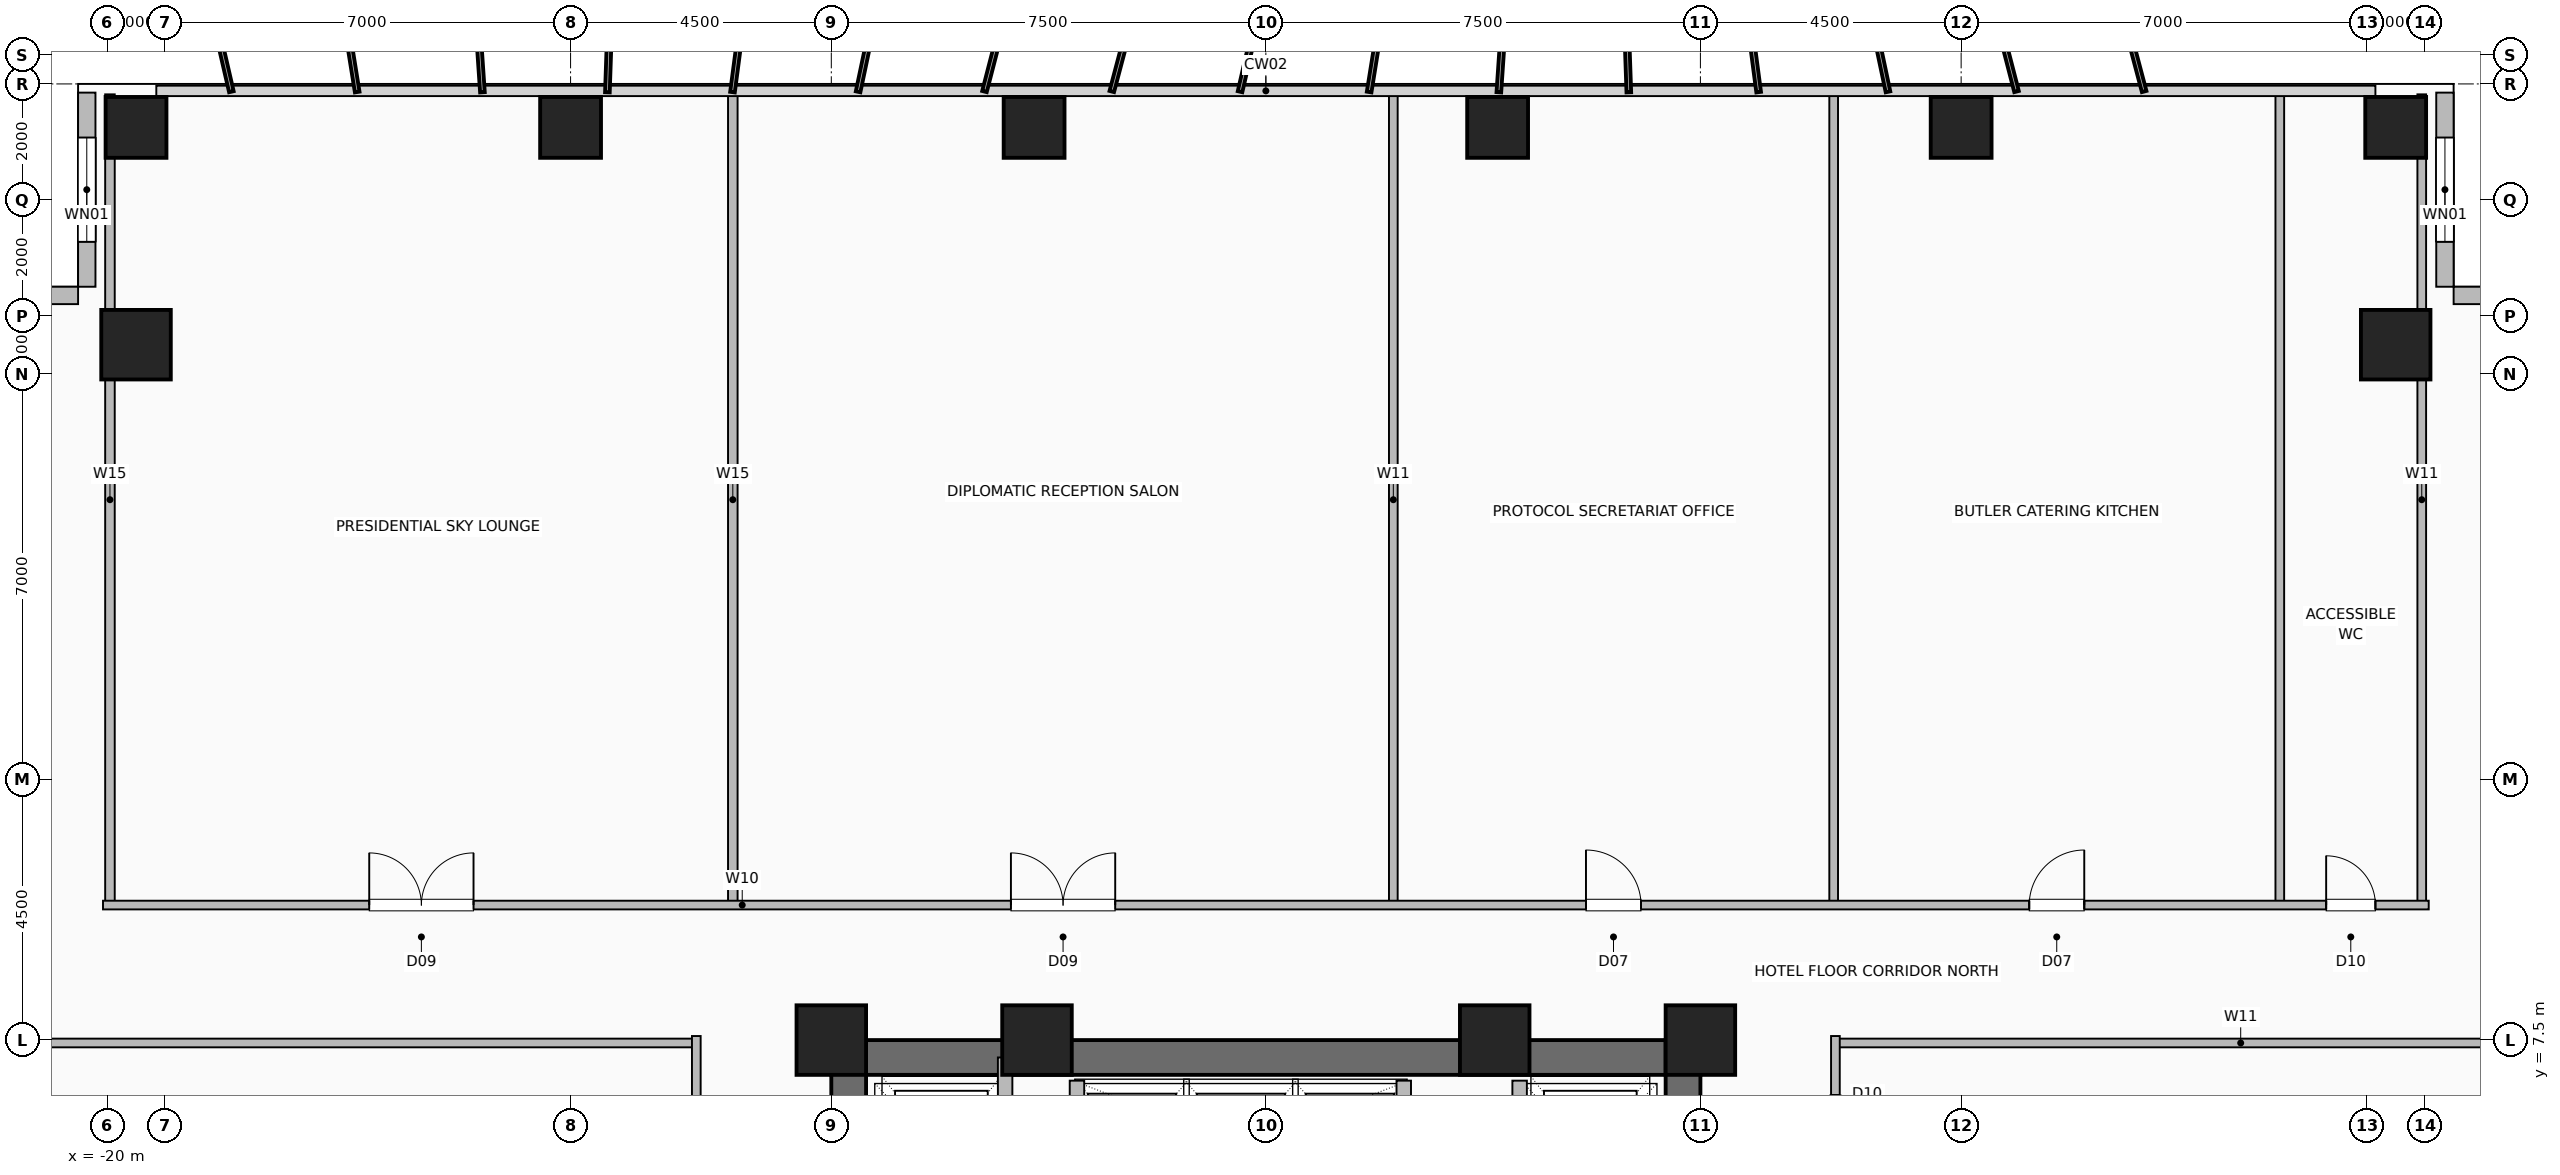
"""IFC4 building model, lengths in metres.
Left out: names, types, materials, properties, quantities, classifications, styles, units other than length and angle.
Written with IfcOpenShell. Run it as: python <this file> out.ifc"""

import sys

from ifc_helpers import new_model, si_unit, direction, frame, frame_2d, origin, origin_2d, place, context, subcontext, project, spatial, rectangle, hollow_rectangle, extrude, element, fill, save


model = new_model("IFC4")
c1 = context("Model", 3, precision=1e-05, world=origin(), true_north=direction((0.0, 1.0)))
c2 = subcontext(c1, "Body", "Model", "MODEL_VIEW")
j1 = project(units=[si_unit("LENGTHUNIT", "METRE"), si_unit("PLANEANGLEUNIT", "RADIAN")], contexts=[c1])
p1 = place(None, origin())
s1 = spatial("IfcSite", under=j1, at=p1, CompositionType="ELEMENT")
p2 = place(p1, origin())
s2 = spatial("IfcBuilding", under=s1, at=p2, CompositionType="ELEMENT")
p3 = place(p2, frame((0.0, 0.0, 79.5)))
s3 = spatial("IfcBuildingStorey", under=s2, at=p3, CompositionType="ELEMENT", Elevation=79.5)
for number, where, z_axis, x_axis in (
    (1, (7.5, 7.5, 0.0), (0.0, 0.0, 1.0), (1.0, 0.0, 0.0)),
    (2, (3.95, 7.5, 0.0), (0.0, 0.0, 1.0), (1.0, 0.0, 0.0)),
    (3, (-3.95, 7.5, 0.0), (0.0, 0.0, 1.0), (1.0, 0.0, 0.0)),
    (4, (-7.5, 7.5, 0.0), (0.0, 0.0, 1.0), (1.0, 0.0, 0.0)),
):
    element("IfcColumn", number, at=place(p3, frame(where, z_axis=z_axis, x_axis=x_axis)), inside=s3, PredefinedType="COLUMN", context=c2, shape_type="SweptSolid", body=[
        extrude(hollow_rectangle(XDim=1.2, YDim=1.2, WallThickness=0.055, at=origin_2d()), origin(), (0.0, 0.0, 1.0), 3.5),
    ])
for number, where, z_axis, x_axis in (
    (5, (-19.5, 23.25, 0.0), (0.0, 0.0, 1.0), (1.0, 0.0, 0.0)),
    (6, (-12.0, 23.25, 0.0), (0.0, 0.0, 1.0), (1.0, 0.0, 0.0)),
    (7, (-4.0, 23.25, 0.0), (0.0, 0.0, 1.0), (1.0, 0.0, 0.0)),
    (8, (4.0, 23.25, 0.0), (0.0, 0.0, 1.0), (1.0, 0.0, 0.0)),
    (9, (12.0, 23.25, 0.0), (0.0, 0.0, 1.0), (1.0, 0.0, 0.0)),
    (10, (19.5, 23.25, 0.0), (0.0, 0.0, 1.0), (1.0, 0.0, 0.0)),
):
    element("IfcColumn", number, at=place(p3, frame(where, z_axis=z_axis, x_axis=x_axis)), inside=s3, PredefinedType="COLUMN", context=c2, shape_type="SweptSolid", body=[
        extrude(hollow_rectangle(XDim=1.05, YDim=1.05, WallThickness=0.05, at=origin_2d()), origin(), (0.0, 0.0, 1.0), 3.5),
    ])
for number, where, z_axis, x_axis in (
    (11, (19.5, 19.5, 0.0), (0.0, 0.0, 1.0), (1.0, 0.0, 0.0)),
    (12, (-19.5, 19.5, 0.0), (0.0, 0.0, 1.0), (1.0, 0.0, 0.0)),
):
    element("IfcColumn", number, at=place(p3, frame(where, z_axis=z_axis, x_axis=x_axis)), inside=s3, PredefinedType="COLUMN", context=c2, shape_type="SweptSolid", body=[
        extrude(hollow_rectangle(XDim=1.2, YDim=1.2, WallThickness=0.055, at=origin_2d()), origin(), (0.0, 0.0, 1.0), 3.5),
    ])
p4 = place(p3, frame((20.35, 23.85, 0.0), z_axis=(0.0, 0.0, 1.0), x_axis=(0.0, -1.0, 0.0)))
e13 = element("IfcWall", 13, at=p4, inside=s3, PredefinedType="SOLIDWALL", context=c2, shape_type="SweptSolid", body=[
    extrude(rectangle(XDim=3.35, YDim=0.3, at=frame_2d((1.675, 0.0))), origin(), (0.0, 0.0, 1.0), 3.15),
])
p5 = place(p4, frame((0.775, 0.0, 0.9)))
e14 = element("IfcOpeningElement", 14, at=p5, cuts=e13, PredefinedType="OPENING", context=c2, shape_type="SweptSolid", body=[
    extrude(rectangle(XDim=1.8, YDim=1.8, at=frame_2d((0.9, 0.9))), frame((0.0, 0.16, 0.0), z_axis=(0.0, -1.0, 0.0), x_axis=(1.0, 0.0, 0.0)), (0.0, 0.0, 1.0), 0.32),
])
p6 = place(p3, frame((23.85, 20.35, 0.0), z_axis=(0.0, 0.0, 1.0), x_axis=(-1.0, 0.0, 0.0)))
e15 = element("IfcWall", 15, at=p6, inside=s3, PredefinedType="SOLIDWALL", context=c2, shape_type="SweptSolid", body=[
    extrude(rectangle(XDim=3.35, YDim=0.3, at=frame_2d((1.675, 0.0))), origin(), (0.0, 0.0, 1.0), 3.15),
])
p7 = place(p3, frame((-20.35, 23.85, 0.0), z_axis=(0.0, 0.0, 1.0), x_axis=(0.0, -1.0, 0.0)))
e16 = element("IfcWall", 16, at=p7, inside=s3, PredefinedType="SOLIDWALL", context=c2, shape_type="SweptSolid", body=[
    extrude(rectangle(XDim=3.35, YDim=0.3, at=frame_2d((1.675, 0.0))), origin(), (0.0, 0.0, 1.0), 3.15),
])
p8 = place(p7, frame((0.775, 0.0, 0.9)))
e17 = element("IfcOpeningElement", 17, at=p8, cuts=e16, PredefinedType="OPENING", context=c2, shape_type="SweptSolid", body=[
    extrude(rectangle(XDim=1.8, YDim=1.8, at=frame_2d((0.9, 0.9))), frame((0.0, 0.16, 0.0), z_axis=(0.0, -1.0, 0.0), x_axis=(1.0, 0.0, 0.0)), (0.0, 0.0, 1.0), 0.32),
])
p9 = place(p3, frame((-23.85, 20.35, 0.0), z_axis=(0.0, 0.0, 1.0), x_axis=(1.0, 0.0, 0.0)))
e18 = element("IfcWall", 18, at=p9, inside=s3, PredefinedType="SOLIDWALL", context=c2, shape_type="SweptSolid", body=[
    extrude(rectangle(XDim=3.35, YDim=0.3, at=frame_2d((1.675, 0.0))), origin(), (0.0, 0.0, 1.0), 3.15),
])
p10 = place(p3, frame((-7.5, 7.2, 0.0), z_axis=(0.0, 0.0, 1.0), x_axis=(1.0, 0.0, 0.0)))
e19 = element("IfcWall", 19, at=p10, inside=s3, PredefinedType="SHEAR", context=c2, shape_type="SweptSolid", body=[
    extrude(rectangle(XDim=15.0, YDim=0.6, at=frame_2d((7.5, 0.0))), origin(), (0.0, 0.0, 1.0), 3.15),
])
p11 = place(p3, frame((-7.2, -7.5, 0.0), z_axis=(0.0, 0.0, 1.0), x_axis=(0.0, 1.0, 0.0)))
e20 = element("IfcWall", 20, at=p11, inside=s3, PredefinedType="SHEAR", context=c2, shape_type="SweptSolid", body=[
    extrude(rectangle(XDim=15.0, YDim=0.6, at=frame_2d((7.5, 0.0))), origin(), (0.0, 0.0, 1.0), 3.15),
])
p12 = place(p11, frame((9.5, 0.0, 0.0)))
e21 = element("IfcOpeningElement", 21, at=p12, cuts=e20, PredefinedType="OPENING", context=c2, shape_type="SweptSolid", body=[
    extrude(rectangle(XDim=1.0, YDim=2.08, at=frame_2d((0.5, 1.04))), frame((0.0, 0.31, 0.0), z_axis=(0.0, -1.0, 0.0), x_axis=(1.0, 0.0, 0.0)), (0.0, 0.0, 1.0), 0.62),
])
p13 = place(p3, frame((7.2, -7.5, 0.0), z_axis=(0.0, 0.0, 1.0), x_axis=(0.0, 1.0, 0.0)))
e22 = element("IfcWall", 22, at=p13, inside=s3, PredefinedType="SHEAR", context=c2, shape_type="SweptSolid", body=[
    extrude(rectangle(XDim=15.0, YDim=0.6, at=frame_2d((7.5, 0.0))), origin(), (0.0, 0.0, 1.0), 3.15),
])
for number, where, z_axis, x_axis in (
    (23, (-3.26, 4.58, 0.0), (0.0, 0.0, 1.0), (0.0, 1.0, 0.0)),
    (24, (2.38, 4.58, 0.0), (0.0, 0.0, 1.0), (0.0, 1.0, 0.0)),
):
    element("IfcWall", number, at=place(p3, frame(where, z_axis=z_axis, x_axis=x_axis)), inside=s3, PredefinedType="SHEAR", context=c2, shape_type="SweptSolid", body=[
        extrude(rectangle(XDim=2.22, YDim=0.25, at=frame_2d((1.11, 0.0))), origin(), (0.0, 0.0, 1.0), 3.15),
    ])
p14 = place(p3, frame((-4.5, 4.35, 0.0), z_axis=(0.0, 0.0, 1.0), x_axis=(0.0, 1.0, 0.0)))
e25 = element("IfcWall", 25, at=p14, inside=s3, PredefinedType="SHEAR", context=c2, shape_type="SweptSolid", body=[
    extrude(rectangle(XDim=2.85, YDim=0.25, at=frame_2d((1.425, 0.0))), origin(), (0.0, 0.0, 1.0), 3.15),
])
p15 = place(p3, frame((4.38, 4.3, 0.0), z_axis=(0.0, 0.0, 1.0), x_axis=(0.0, 1.0, 0.0)))
e26 = element("IfcWall", 26, at=p15, inside=s3, PredefinedType="SHEAR", context=c2, shape_type="SweptSolid", body=[
    extrude(rectangle(XDim=2.5, YDim=0.25, at=frame_2d((1.25, 0.0))), origin(), (0.0, 0.0, 1.0), 3.15),
])
p16 = place(p15, frame((0.8, 0.0, 0.0)))
e27 = element("IfcOpeningElement", 27, at=p16, cuts=e26, PredefinedType="OPENING", context=c2, shape_type="SweptSolid", body=[
    extrude(rectangle(XDim=1.2, YDim=2.2, at=frame_2d((0.6, 1.1))), frame((0.0, 0.135, 0.0), z_axis=(0.0, -1.0, 0.0), x_axis=(1.0, 0.0, 0.0)), (0.0, 0.0, 1.0), 0.27),
])
for number, where, z_axis, x_axis in (
    (28, (-19.95, 9.83, 0.0), (0.0, 0.0, 1.0), (0.0, 1.0, 0.0)),
    (29, (-9.2, 9.83, 0.0), (0.0, 0.0, 1.0), (0.0, 1.0, 0.0)),
):
    element("IfcWall", number, at=place(p3, frame(where, z_axis=z_axis, x_axis=x_axis)), inside=s3, PredefinedType="PLUMBINGWALL", context=c2, shape_type="SweptSolid", body=[
        extrude(rectangle(XDim=13.99, YDim=0.165, at=frame_2d((6.995, 0.0))), origin(), (0.0, 0.0, 1.0), 3.15),
    ])
for number, where, z_axis, x_axis in (
    (30, (2.2, 9.83, 0.0), (0.0, 0.0, 1.0), (0.0, 1.0, 0.0)),
    (31, (9.8, 9.83, 0.0), (0.0, 0.0, 1.0), (0.0, 1.0, 0.0)),
    (32, (17.5, 9.83, 0.0), (0.0, 0.0, 1.0), (0.0, 1.0, 0.0)),
    (33, (19.95, 9.83, 0.0), (0.0, 0.0, 1.0), (0.0, 1.0, 0.0)),
):
    element("IfcWall", number, at=place(p3, frame(where, z_axis=z_axis, x_axis=x_axis)), inside=s3, PredefinedType="PARTITIONING", context=c2, shape_type="SweptSolid", body=[
        extrude(rectangle(XDim=13.99, YDim=0.15, at=frame_2d((6.995, 0.0))), origin(), (0.0, 0.0, 1.0), 3.15),
    ])
p17 = place(p3, frame((-20.07, 9.83, 0.0), z_axis=(0.0, 0.0, 1.0), x_axis=(1.0, 0.0, 0.0)))
e34 = element("IfcWall", 34, at=p17, inside=s3, PredefinedType="PARTITIONING", context=c2, shape_type="SweptSolid", body=[
    extrude(rectangle(XDim=40.14, YDim=0.15, at=frame_2d((20.07, 0.0))), origin(), (0.0, 0.0, 1.0), 3.15),
])
p18 = place(p17, frame((4.595, 0.0, 0.0)))
e35 = element("IfcOpeningElement", 35, at=p18, cuts=e34, PredefinedType="OPENING", context=c2, shape_type="SweptSolid", body=[
    extrude(rectangle(XDim=1.8, YDim=2.08, at=frame_2d((0.9, 1.04))), frame((0.0, 0.085, 0.0), z_axis=(0.0, -1.0, 0.0), x_axis=(1.0, 0.0, 0.0)), (0.0, 0.0, 1.0), 0.17),
])
p19 = place(p17, frame((15.67, 0.0, 0.0)))
e36 = element("IfcOpeningElement", 36, at=p19, cuts=e34, PredefinedType="OPENING", context=c2, shape_type="SweptSolid", body=[
    extrude(rectangle(XDim=1.8, YDim=2.08, at=frame_2d((0.9, 1.04))), frame((0.0, 0.085, 0.0), z_axis=(0.0, -1.0, 0.0), x_axis=(1.0, 0.0, 0.0)), (0.0, 0.0, 1.0), 0.17),
])
p20 = place(p17, frame((25.595, 0.0, 0.0)))
e37 = element("IfcOpeningElement", 37, at=p20, cuts=e34, PredefinedType="OPENING", context=c2, shape_type="SweptSolid", body=[
    extrude(rectangle(XDim=0.95, YDim=2.06, at=frame_2d((0.475, 1.03))), frame((0.0, 0.085, 0.0), z_axis=(0.0, -1.0, 0.0), x_axis=(1.0, 0.0, 0.0)), (0.0, 0.0, 1.0), 0.17),
])
p21 = place(p17, frame((33.245, 0.0, 0.0)))
e38 = element("IfcOpeningElement", 38, at=p21, cuts=e34, PredefinedType="OPENING", context=c2, shape_type="SweptSolid", body=[
    extrude(rectangle(XDim=0.95, YDim=2.06, at=frame_2d((0.475, 1.03))), frame((0.0, 0.085, 0.0), z_axis=(0.0, -1.0, 0.0), x_axis=(1.0, 0.0, 0.0)), (0.0, 0.0, 1.0), 0.17),
])
p22 = place(p17, frame((38.37, 0.0, 0.0)))
e39 = element("IfcOpeningElement", 39, at=p22, cuts=e34, PredefinedType="OPENING", context=c2, shape_type="SweptSolid", body=[
    extrude(rectangle(XDim=0.85, YDim=2.05, at=frame_2d((0.425, 1.025))), frame((0.0, 0.085, 0.0), z_axis=(0.0, -1.0, 0.0), x_axis=(1.0, 0.0, 0.0)), (0.0, 0.0, 1.0), 0.17),
])
p23 = place(p3, frame((-23.82, 7.45, 0.0), z_axis=(0.0, 0.0, 1.0), x_axis=(1.0, 0.0, 0.0)))
e40 = element("IfcWall", 40, at=p23, inside=s3, PredefinedType="PARTITIONING", context=c2, shape_type="SweptSolid", body=[
    extrude(rectangle(XDim=13.99, YDim=0.15, at=frame_2d((6.995, 0.0))), origin(), (0.0, 0.0, 1.0), 3.15),
])
p24 = place(p3, frame((-9.83, -7.57, 0.0), z_axis=(0.0, 0.0, 1.0), x_axis=(0.0, 1.0, 0.0)))
e41 = element("IfcWall", 41, at=p24, inside=s3, PredefinedType="PARTITIONING", context=c2, shape_type="SweptSolid", body=[
    extrude(rectangle(XDim=15.14, YDim=0.15, at=frame_2d((7.57, 0.0))), origin(), (0.0, 0.0, 1.0), 3.15),
])
p25 = place(p24, frame((2.12, 0.0, 0.0)))
e42 = element("IfcOpeningElement", 42, at=p25, cuts=e41, PredefinedType="OPENING", context=c2, shape_type="SweptSolid", body=[
    extrude(rectangle(XDim=0.95, YDim=2.06, at=frame_2d((0.475, 1.03))), frame((0.0, 0.085, 0.0), z_axis=(0.0, -1.0, 0.0), x_axis=(1.0, 0.0, 0.0)), (0.0, 0.0, 1.0), 0.17),
])
p26 = place(p24, frame((7.095, 0.0, 0.0)))
e43 = element("IfcOpeningElement", 43, at=p26, cuts=e41, PredefinedType="OPENING", context=c2, shape_type="SweptSolid", body=[
    extrude(rectangle(XDim=0.95, YDim=2.06, at=frame_2d((0.475, 1.03))), frame((0.0, 0.085, 0.0), z_axis=(0.0, -1.0, 0.0), x_axis=(1.0, 0.0, 0.0)), (0.0, 0.0, 1.0), 0.17),
])
p27 = place(p24, frame((12.07, 0.0, 0.0)))
e44 = element("IfcOpeningElement", 44, at=p27, cuts=e41, PredefinedType="OPENING", context=c2, shape_type="SweptSolid", body=[
    extrude(rectangle(XDim=0.95, YDim=2.06, at=frame_2d((0.475, 1.03))), frame((0.0, 0.085, 0.0), z_axis=(0.0, -1.0, 0.0), x_axis=(1.0, 0.0, 0.0)), (0.0, 0.0, 1.0), 0.17),
])
p28 = place(p3, frame((9.83, 7.45, 0.0), z_axis=(0.0, 0.0, 1.0), x_axis=(1.0, 0.0, 0.0)))
e45 = element("IfcWall", 45, at=p28, inside=s3, PredefinedType="PARTITIONING", context=c2, shape_type="SweptSolid", body=[
    extrude(rectangle(XDim=13.99, YDim=0.15, at=frame_2d((6.995, 0.0))), origin(), (0.0, 0.0, 1.0), 3.15),
])
p29 = place(p3, frame((9.83, -7.57, 0.0), z_axis=(0.0, 0.0, 1.0), x_axis=(0.0, 1.0, 0.0)))
e46 = element("IfcWall", 46, at=p29, inside=s3, PredefinedType="PARTITIONING", context=c2, shape_type="SweptSolid", body=[
    extrude(rectangle(XDim=15.14, YDim=0.15, at=frame_2d((7.57, 0.0))), origin(), (0.0, 0.0, 1.0), 3.15),
])
p30 = place(p29, frame((2.27, 0.0, 0.0)))
e47 = element("IfcOpeningElement", 47, at=p30, cuts=e46, PredefinedType="OPENING", context=c2, shape_type="SweptSolid", body=[
    extrude(rectangle(XDim=0.95, YDim=2.06, at=frame_2d((0.475, 1.03))), frame((0.0, 0.085, 0.0), z_axis=(0.0, -1.0, 0.0), x_axis=(1.0, 0.0, 0.0)), (0.0, 0.0, 1.0), 0.17),
])
p31 = place(p29, frame((8.395, 0.0, 0.0)))
e48 = element("IfcOpeningElement", 48, at=p31, cuts=e46, PredefinedType="OPENING", context=c2, shape_type="SweptSolid", body=[
    extrude(rectangle(XDim=0.95, YDim=2.06, at=frame_2d((0.475, 1.03))), frame((0.0, 0.085, 0.0), z_axis=(0.0, -1.0, 0.0), x_axis=(1.0, 0.0, 0.0)), (0.0, 0.0, 1.0), 0.17),
])
p32 = place(p29, frame((13.27, 0.0, 0.0)))
e49 = element("IfcOpeningElement", 49, at=p32, cuts=e46, PredefinedType="OPENING", context=c2, shape_type="SweptSolid", body=[
    extrude(rectangle(XDim=0.85, YDim=2.05, at=frame_2d((0.425, 1.025))), frame((0.0, 0.085, 0.0), z_axis=(0.0, -1.0, 0.0), x_axis=(1.0, 0.0, 0.0)), (0.0, 0.0, 1.0), 0.17),
])
p33 = place(p5, origin())
e50 = element("IfcWindow", 50, at=p33, inside=s3, PartitioningType="SINGLE_PANEL", PredefinedType="WINDOW", context=c2, shape_type="SweptSolid", body=[
    extrude(rectangle(XDim=1.8, YDim=1.8, at=frame_2d((0.9, 0.9))), frame((0.0, 0.03, 0.0), z_axis=(0.0, -1.0, 0.0), x_axis=(1.0, 0.0, 0.0)), (0.0, 0.0, 1.0), 0.06),
])
fill(e14, e50)
p34 = place(p8, origin())
e51 = element("IfcWindow", 51, at=p34, inside=s3, PartitioningType="SINGLE_PANEL", PredefinedType="WINDOW", context=c2, shape_type="SweptSolid", body=[
    extrude(rectangle(XDim=1.8, YDim=1.8, at=frame_2d((0.9, 0.9))), frame((0.0, 0.03, 0.0), z_axis=(0.0, -1.0, 0.0), x_axis=(1.0, 0.0, 0.0)), (0.0, 0.0, 1.0), 0.06),
])
fill(e17, e51)
p35 = place(p18, origin())
e52 = element("IfcDoor", 52, at=p35, inside=s3, OperationType="DOUBLE_DOOR_SINGLE_SWING", PredefinedType="DOOR", context=c2, shape_type="SweptSolid", body=[
    extrude(rectangle(XDim=1.8, YDim=2.08, at=frame_2d((0.9, 1.04))), frame((0.0, 0.025, 0.0), z_axis=(0.0, -1.0, 0.0), x_axis=(1.0, 0.0, 0.0)), (0.0, 0.0, 1.0), 0.05),
])
fill(e35, e52)
p36 = place(p19, origin())
e53 = element("IfcDoor", 53, at=p36, inside=s3, OperationType="DOUBLE_DOOR_SINGLE_SWING", PredefinedType="DOOR", context=c2, shape_type="SweptSolid", body=[
    extrude(rectangle(XDim=1.8, YDim=2.08, at=frame_2d((0.9, 1.04))), frame((0.0, 0.025, 0.0), z_axis=(0.0, -1.0, 0.0), x_axis=(1.0, 0.0, 0.0)), (0.0, 0.0, 1.0), 0.05),
])
fill(e36, e53)
p37 = place(p20, origin())
e54 = element("IfcDoor", 54, at=p37, inside=s3, OperationType="SINGLE_SWING_LEFT", PredefinedType="DOOR", context=c2, shape_type="SweptSolid", body=[
    extrude(rectangle(XDim=0.95, YDim=2.06, at=frame_2d((0.475, 1.03))), frame((0.0, 0.025, 0.0), z_axis=(0.0, -1.0, 0.0), x_axis=(1.0, 0.0, 0.0)), (0.0, 0.0, 1.0), 0.05),
])
fill(e37, e54)
p38 = place(p21, origin())
e55 = element("IfcDoor", 55, at=p38, inside=s3, OperationType="SINGLE_SWING_RIGHT", PredefinedType="DOOR", context=c2, shape_type="SweptSolid", body=[
    extrude(rectangle(XDim=0.95, YDim=2.06, at=frame_2d((0.475, 1.03))), frame((0.0, 0.025, 0.0), z_axis=(0.0, -1.0, 0.0), x_axis=(1.0, 0.0, 0.0)), (0.0, 0.0, 1.0), 0.05),
])
fill(e38, e55)
p39 = place(p22, origin())
e56 = element("IfcDoor", 56, at=p39, inside=s3, OperationType="SINGLE_SWING_LEFT", PredefinedType="DOOR", context=c2, shape_type="SweptSolid", body=[
    extrude(rectangle(XDim=0.85, YDim=2.05, at=frame_2d((0.425, 1.025))), frame((0.0, 0.025, 0.0), z_axis=(0.0, -1.0, 0.0), x_axis=(1.0, 0.0, 0.0)), (0.0, 0.0, 1.0), 0.05),
])
fill(e39, e56)
save(model, sys.argv[1])
